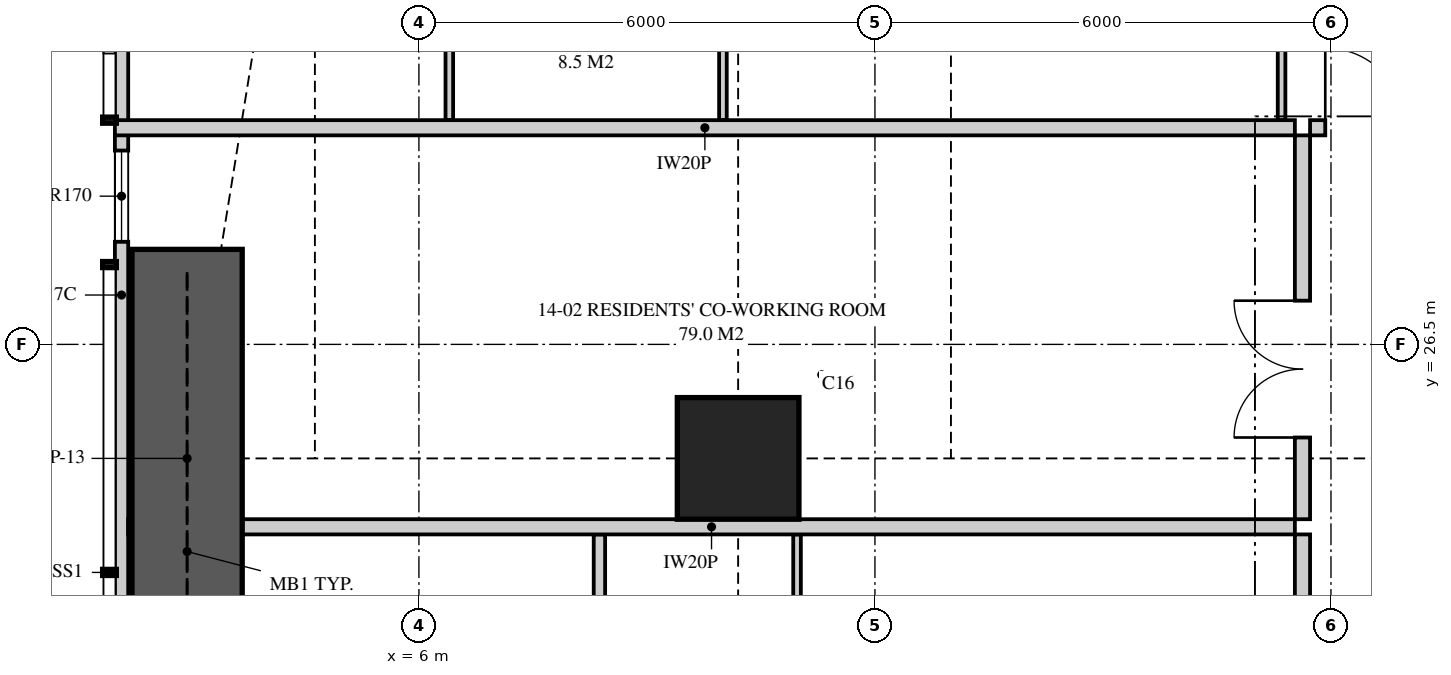
"""IFC4 building model, lengths in metres.
Left out: names, types, materials, properties, quantities, classifications, styles, units other than length and angle.
Written with IfcOpenShell. Run it as: python <this file> out.ifc"""

import sys

from ifc_helpers import new_model, si_unit, direction, frame, frame_2d, origin, origin_2d, place, context, subcontext, project, spatial, polyline, rectangle, outline, extrude, element, fill, save


model = new_model("IFC4")
c1 = context("Model", 3, precision=1e-05, world=origin(), true_north=direction((0.0, 1.0)))
c2 = subcontext(c1, "Body", "Model", "MODEL_VIEW")
j1 = project(units=[si_unit("LENGTHUNIT", "METRE"), si_unit("PLANEANGLEUNIT", "RADIAN")], contexts=[c1])
p1 = place(None, origin())
s1 = spatial("IfcSite", under=j1, at=p1, CompositionType="ELEMENT")
p2 = place(p1, origin())
s2 = spatial("IfcBuilding", under=s1, at=p2, CompositionType="ELEMENT")
p3 = place(p2, frame((0.0, 0.0, 54.5)))
s3 = spatial("IfcBuildingStorey", under=s2, at=p3, CompositionType="ELEMENT", Elevation=54.5)
p4 = place(p3, frame((10.2, 25.0, 0.0), z_axis=(0.0, 0.0, 1.0), x_axis=(1.0, 0.0, 0.0)))
e1 = element("IfcColumn", 1, at=p4, inside=s3, PredefinedType="COLUMN", context=c2, shape_type="SweptSolid", body=[
    extrude(rectangle(XDim=1.6, YDim=1.6, at=origin_2d()), origin(), (0.0, 0.0, 1.0), 3.35),
])
p5 = place(p3, frame((2.087, 34.949, 0.0), z_axis=(0.0, 0.0, 1.0), x_axis=(0.0, -1.0, 0.0)))
e2 = element("IfcWall", 2, at=p5, inside=s3, PredefinedType="SOLIDWALL", context=c2, shape_type="SweptSolid", body=[
    extrude(outline(polyline([(0.0, 0.0), (15.599, 0.0), (15.599, 2.15), (9.949, 2.15), (9.949, 3.11), (9.823, 3.11), (9.823, 2.15), (9.73, 2.15), (9.73, 3.11), (0.0, 3.11), (0.0, 0.0)])), frame((0.0, 0.087, 0.0), z_axis=(0.0, -1.0, 0.0), x_axis=(1.0, 0.0, 0.0)), (0.0, 0.0, 1.0), 0.175),
])
p6 = place(p5, frame((2.722, 0.0, 0.4)))
e3 = element("IfcOpeningElement", 3, at=p6, cuts=e2, PredefinedType="OPENING", context=c2, shape_type="SweptSolid", body=[
    extrude(rectangle(XDim=1.8, YDim=1.7, at=frame_2d((0.9, 0.85))), frame((0.0, 0.097, 0.0), z_axis=(0.0, -1.0, 0.0), x_axis=(1.0, 0.0, 0.0)), (0.0, 0.0, 1.0), 0.195),
])
p7 = place(p5, frame((5.899, 0.0, 0.4)))
e4 = element("IfcOpeningElement", 4, at=p7, cuts=e2, PredefinedType="OPENING", context=c2, shape_type="SweptSolid", body=[
    extrude(rectangle(XDim=1.2, YDim=1.7, at=frame_2d((0.6, 0.85))), frame((0.0, 0.097, 0.0), z_axis=(0.0, -1.0, 0.0), x_axis=(1.0, 0.0, 0.0)), (0.0, 0.0, 1.0), 0.195),
])
p8 = place(p5, frame((12.824, 0.0, 0.4)))
e5 = element("IfcOpeningElement", 5, at=p8, cuts=e2, PredefinedType="OPENING", context=c2, shape_type="SweptSolid", body=[
    extrude(rectangle(XDim=1.8, YDim=1.7, at=frame_2d((0.9, 0.85))), frame((0.0, 0.097, 0.0), z_axis=(0.0, -1.0, 0.0), x_axis=(1.0, 0.0, 0.0)), (0.0, 0.0, 1.0), 0.195),
])
p9 = place(p3, frame((17.725, 29.35, 0.0), z_axis=(0.0, 0.0, 1.0), x_axis=(1.0, 0.0, 0.0)))
e6 = element("IfcWall", 6, at=p9, inside=s3, PredefinedType="PARTITIONING", context=c2, shape_type="SweptSolid", body=[
    extrude(outline(polyline([(0.0, 0.0), (15.275, 0.0), (15.275, 3.11), (6.612, 3.11), (6.612, 2.541), (5.938, 2.541), (5.938, 3.11), (0.0, 3.11), (0.0, 0.0)])), frame((0.0, 0.1, 0.0), z_axis=(0.0, -1.0, 0.0), x_axis=(1.0, 0.0, 0.0)), (0.0, 0.0, 1.0), 0.2),
])
p10 = place(p9, frame((0.2, 0.0, 0.0)))
e7 = element("IfcOpeningElement", 7, at=p10, cuts=e6, PredefinedType="OPENING", context=c2, shape_type="SweptSolid", body=[
    extrude(rectangle(XDim=1.05, YDim=2.2, at=frame_2d((0.525, 1.1))), frame((0.0, 0.11, 0.0), z_axis=(0.0, -1.0, 0.0), x_axis=(1.0, 0.0, 0.0)), (0.0, 0.0, 1.0), 0.22),
])
p11 = place(p3, frame((6.4, 37.825, 0.0), z_axis=(0.0, 0.0, 1.0), x_axis=(0.0, -1.0, 0.0)))
e8 = element("IfcWall", 8, at=p11, inside=s3, PredefinedType="PARTITIONING", context=c2, shape_type="SweptSolid", body=[
    extrude(outline(polyline([(0.0, 0.0), (8.375, 0.0), (8.375, 3.11), (2.978, 3.11), (2.978, 2.15), (1.224, 2.15), (1.224, 3.11), (0.0, 3.11), (0.0, 0.0)])), frame((0.0, 0.05, 0.0), z_axis=(0.0, -1.0, 0.0), x_axis=(1.0, 0.0, 0.0)), (0.0, 0.0, 1.0), 0.1),
])
p12 = place(p11, frame((3.422, 0.0, 0.0)))
e9 = element("IfcOpeningElement", 9, at=p12, cuts=e8, PredefinedType="OPENING", context=c2, shape_type="SweptSolid", body=[
    extrude(rectangle(XDim=0.9, YDim=2.1, at=frame_2d((0.45, 1.05))), frame((0.0, 0.06, 0.0), z_axis=(0.0, -1.0, 0.0), x_axis=(1.0, 0.0, 0.0)), (0.0, 0.0, 1.0), 0.12),
])
p13 = place(p11, frame((6.023, 0.0, 0.0)))
e10 = element("IfcOpeningElement", 10, at=p13, cuts=e8, PredefinedType="OPENING", context=c2, shape_type="SweptSolid", body=[
    extrude(rectangle(XDim=0.9, YDim=2.1, at=frame_2d((0.45, 1.05))), frame((0.0, 0.06, 0.0), z_axis=(0.0, -1.0, 0.0), x_axis=(1.0, 0.0, 0.0)), (0.0, 0.0, 1.0), 0.12),
])
p14 = place(p3, frame((10.0, 36.487, 0.0), z_axis=(0.0, 0.0, 1.0), x_axis=(0.0, -1.0, 0.0)))
e11 = element("IfcWall", 11, at=p14, inside=s3, PredefinedType="PARTITIONING", context=c2, shape_type="SweptSolid", body=[
    extrude(outline(polyline([(0.0, 0.0), (7.037, 0.0), (7.037, 2.51), (0.917, 2.51), (0.917, 2.15), (0.0, 2.15), (0.0, 0.0)])), frame((0.0, 0.05, 0.0), z_axis=(0.0, -1.0, 0.0), x_axis=(1.0, 0.0, 0.0)), (0.0, 0.0, 1.0), 0.1),
])
p15 = place(p14, frame((3.188, 0.0, 0.0)))
e12 = element("IfcOpeningElement", 12, at=p15, cuts=e11, PredefinedType="OPENING", context=c2, shape_type="SweptSolid", body=[
    extrude(rectangle(XDim=0.9, YDim=2.1, at=frame_2d((0.45, 1.05))), frame((0.0, 0.06, 0.0), z_axis=(0.0, -1.0, 0.0), x_axis=(1.0, 0.0, 0.0)), (0.0, 0.0, 1.0), 0.12),
])
p16 = place(p14, frame((4.612, 0.0, 0.0)))
e13 = element("IfcOpeningElement", 13, at=p16, cuts=e11, PredefinedType="OPENING", context=c2, shape_type="SweptSolid", body=[
    extrude(rectangle(XDim=0.9, YDim=2.1, at=frame_2d((0.45, 1.05))), frame((0.0, 0.06, 0.0), z_axis=(0.0, -1.0, 0.0), x_axis=(1.0, 0.0, 0.0)), (0.0, 0.0, 1.0), 0.12),
])
p17 = place(p3, frame((17.35, 37.825, 0.0), z_axis=(0.0, 0.0, 1.0), x_axis=(0.0, -1.0, 0.0)))
e14 = element("IfcWall", 14, at=p17, inside=s3, PredefinedType="PARTITIONING", context=c2, shape_type="SweptSolid", body=[
    extrude(outline(polyline([(0.0, 0.0), (8.375, 0.0), (8.375, 3.11), (1.635, 3.11), (1.635, 2.15), (0.0, 2.15), (0.0, 3.11), (0.0, 0.0)])), frame((0.0, 0.05, 0.0), z_axis=(0.0, -1.0, 0.0), x_axis=(1.0, 0.0, 0.0)), (0.0, 0.0, 1.0), 0.1),
])
p18 = place(p17, frame((3.688, 0.0, 0.0)))
e15 = element("IfcOpeningElement", 15, at=p18, cuts=e14, PredefinedType="OPENING", context=c2, shape_type="SweptSolid", body=[
    extrude(rectangle(XDim=1.0, YDim=2.1, at=frame_2d((0.5, 1.05))), frame((0.0, 0.06, 0.0), z_axis=(0.0, -1.0, 0.0), x_axis=(1.0, 0.0, 0.0)), (0.0, 0.0, 1.0), 0.12),
])
p19 = place(p3, frame((2.0, 29.35, 0.0), z_axis=(0.0, 0.0, 1.0), x_axis=(1.0, 0.0, 0.0)))
e16 = element("IfcWall", 16, at=p19, inside=s3, PredefinedType="PARTITIONING", context=c2, shape_type="SweptSolid", body=[
    extrude(outline(polyline([(0.0, 0.0), (15.525, 0.0), (15.525, 3.11), (11.337, 3.11), (11.337, 2.541), (10.663, 2.541), (10.663, 3.11), (9.51, 3.11), (9.51, 2.51), (6.89, 2.51), (6.89, 3.11), (2.969, 3.11), (2.969, 2.541), (2.577, 2.541), (2.577, 2.15), (0.733, 2.15), (0.733, 3.11), (0.0, 3.11), (0.0, 0.0)])), frame((0.0, 0.1, 0.0), z_axis=(0.0, -1.0, 0.0), x_axis=(1.0, 0.0, 0.0)), (0.0, 0.0, 1.0), 0.2),
])
p20 = place(p3, frame((2.175, 24.1, 0.0), z_axis=(0.0, 0.0, 1.0), x_axis=(1.0, 0.0, 0.0)))
e17 = element("IfcWall", 17, at=p20, inside=s3, PredefinedType="PARTITIONING", context=c2, shape_type="SweptSolid", body=[
    extrude(outline(polyline([(0.529, 2.15), (0.0, 2.15), (0.0, 0.0), (0.529, 0.0), (0.529, 0.889), (1.021, 0.889), (1.021, 0.0), (15.35, 0.0), (15.35, 3.11), (9.335, 3.11), (9.335, 2.51), (6.715, 2.51), (6.715, 3.11), (1.685, 3.11), (1.685, 2.15), (1.021, 2.15), (1.021, 1.261), (0.529, 1.261), (0.529, 2.15)])), frame((0.0, 0.1, 0.0), z_axis=(0.0, -1.0, 0.0), x_axis=(1.0, 0.0, 0.0)), (0.0, 0.0, 1.0), 0.2),
])
p21 = place(p3, frame((17.625, 7.75, 0.0), z_axis=(0.0, 0.0, 1.0), x_axis=(0.0, 1.0, 0.0)))
e18 = element("IfcWall", 18, at=p21, inside=s3, PredefinedType="PARTITIONING", context=c2, shape_type="SweptSolid", body=[
    extrude(outline(polyline([(0.0, 0.0), (16.25, 0.0), (16.25, 3.11), (5.587, 3.11), (5.587, 2.541), (4.913, 2.541), (4.913, 3.11), (0.0, 3.11), (0.0, 0.0)])), frame((0.0, 0.1, 0.0), z_axis=(0.0, -1.0, 0.0), x_axis=(1.0, 0.0, 0.0)), (0.0, 0.0, 1.0), 0.2),
])
p22 = place(p21, frame((7.075, 0.0, 0.0)))
e19 = element("IfcOpeningElement", 19, at=p22, cuts=e18, PredefinedType="OPENING", context=c2, shape_type="SweptSolid", body=[
    extrude(rectangle(XDim=1.05, YDim=2.2, at=frame_2d((0.525, 1.1))), frame((0.0, 0.11, 0.0), z_axis=(0.0, -1.0, 0.0), x_axis=(1.0, 0.0, 0.0)), (0.0, 0.0, 1.0), 0.22),
])
p23 = place(p3, frame((8.375, 19.45, 0.0), z_axis=(0.0, 0.0, 1.0), x_axis=(0.0, 1.0, 0.0)))
e20 = element("IfcWall", 20, at=p23, inside=s3, PredefinedType="PLUMBINGWALL", context=c2, shape_type="SweptSolid", body=[
    extrude(rectangle(XDim=4.55, YDim=0.15, at=frame_2d((2.275, 0.0))), origin(), (0.0, 0.0, 1.0), 3.11),
])
p24 = place(p23, frame((0.4, 0.0, 0.0)))
e21 = element("IfcOpeningElement", 21, at=p24, cuts=e20, PredefinedType="OPENING", context=c2, shape_type="SweptSolid", body=[
    extrude(rectangle(XDim=0.9, YDim=2.1, at=frame_2d((0.45, 1.05))), frame((0.0, 0.085, 0.0), z_axis=(0.0, -1.0, 0.0), x_axis=(1.0, 0.0, 0.0)), (0.0, 0.0, 1.0), 0.17),
])
p25 = place(p3, frame((10.975, 19.45, 0.0), z_axis=(0.0, 0.0, 1.0), x_axis=(0.0, 1.0, 0.0)))
e22 = element("IfcWall", 22, at=p25, inside=s3, PredefinedType="PARTITIONING", context=c2, shape_type="SweptSolid", body=[
    extrude(outline(polyline([(0.0, 0.0), (4.55, 0.0), (4.55, 3.11), (4.55, 2.51), (0.0, 2.51), (0.0, 3.11), (0.0, 0.0)])), frame((0.0, 0.05, 0.0), z_axis=(0.0, -1.0, 0.0), x_axis=(1.0, 0.0, 0.0)), (0.0, 0.0, 1.0), 0.1),
])
p26 = place(p3, frame((17.625, 24.2, 0.0), z_axis=(0.0, 0.0, 1.0), x_axis=(0.0, 1.0, 0.0)))
e23 = element("IfcWall", 23, at=p26, inside=s3, PredefinedType="PARTITIONING", context=c2, shape_type="SweptSolid", body=[
    extrude(outline(polyline([(0.0, 0.0), (5.05, 0.0), (5.05, 3.11), (1.137, 3.11), (1.137, 2.541), (0.463, 2.541), (0.463, 3.11), (0.0, 3.11), (0.0, 0.0)])), frame((0.0, 0.1, 0.0), z_axis=(0.0, -1.0, 0.0), x_axis=(1.0, 0.0, 0.0)), (0.0, 0.0, 1.0), 0.2),
])
p27 = place(p26, frame((1.075, 0.0, 0.0)))
e24 = element("IfcOpeningElement", 24, at=p27, cuts=e23, PredefinedType="OPENING", context=c2, shape_type="SweptSolid", body=[
    extrude(rectangle(XDim=1.8, YDim=2.1, at=frame_2d((0.9, 1.05))), frame((0.0, 0.11, 0.0), z_axis=(0.0, -1.0, 0.0), x_axis=(1.0, 0.0, 0.0)), (0.0, 0.0, 1.0), 0.22),
])
p28 = place(p3, frame((2.95, 22.25, 0.0), z_axis=(0.0, 0.0, 1.0), x_axis=(0.0, 1.0, 0.0)))
e25 = element("IfcWall", 25, at=p28, inside=s3, PredefinedType="SHEAR", context=c2, shape_type="SweptSolid", body=[
    extrude(rectangle(XDim=5.5, YDim=1.45, at=frame_2d((2.75, 0.0))), origin(), (0.0, 0.0, 1.0), 3.35),
])
p29 = place(p7, origin())
e26 = element("IfcWindow", 26, at=p29, inside=s3, PartitioningType="SINGLE_PANEL", PredefinedType="WINDOW", context=c2, shape_type="SweptSolid", body=[
    extrude(rectangle(XDim=1.2, YDim=1.7, at=frame_2d((0.6, 0.85))), frame((0.0, 0.03, 0.0), z_axis=(0.0, -1.0, 0.0), x_axis=(1.0, 0.0, 0.0)), (0.0, 0.0, 1.0), 0.06),
])
fill(e4, e26)
p30 = place(p10, origin())
e27 = element("IfcDoor", 27, at=p30, inside=s3, OperationType="SINGLE_SWING_LEFT", PredefinedType="DOOR", context=c2, shape_type="SweptSolid", body=[
    extrude(rectangle(XDim=1.05, YDim=2.2, at=frame_2d((0.525, 1.1))), frame((0.0, 0.025, 0.0), z_axis=(0.0, -1.0, 0.0), x_axis=(1.0, 0.0, 0.0)), (0.0, 0.0, 1.0), 0.05),
])
fill(e7, e27)
p31 = place(p27, origin())
e28 = element("IfcDoor", 28, at=p31, inside=s3, OperationType="DOUBLE_DOOR_SINGLE_SWING", PredefinedType="DOOR", context=c2, shape_type="SweptSolid", body=[
    extrude(rectangle(XDim=1.8, YDim=2.1, at=frame_2d((0.9, 1.05))), frame((0.0, 0.025, 0.0), z_axis=(0.0, -1.0, 0.0), x_axis=(1.0, 0.0, 0.0)), (0.0, 0.0, 1.0), 0.05),
])
fill(e24, e28)
save(model, sys.argv[1])
